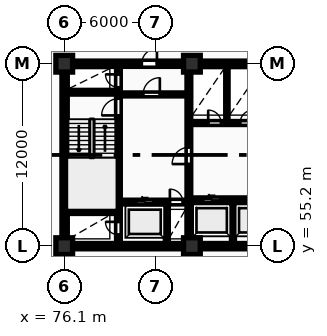
"""IFC4 building model, lengths in metres.
Left out: names, types, materials, properties, quantities, classifications, styles, units other than length and angle.
Written with IfcOpenShell. Run it as: python <this file> out.ifc"""

import sys

from ifc_helpers import new_model, si_unit, direction, frame, frame_2d, origin, origin_2d, place, context, subcontext, project, spatial, rectangle, extrude, element, fill, save


model = new_model("IFC4")
c1 = context("Model", 3, precision=1e-05, world=origin(), true_north=direction((0.0, 1.0)))
c2 = subcontext(c1, "Body", "Model", "MODEL_VIEW")
j1 = project(units=[si_unit("LENGTHUNIT", "METRE"), si_unit("PLANEANGLEUNIT", "RADIAN")], contexts=[c1])
p1 = place(None, origin())
s1 = spatial("IfcSite", under=j1, at=p1, CompositionType="ELEMENT")
p2 = place(p1, origin())
s2 = spatial("IfcBuilding", under=s1, at=p2, CompositionType="ELEMENT")
p3 = place(p2, frame((0.0, 0.0, -3.6)))
s3 = spatial("IfcBuildingStorey", under=s2, at=p3, CompositionType="ELEMENT", Elevation=-3.6)
for number, where, z_axis, x_axis in (
    (1, (76.1, 55.2, 0.0), (0.0, 0.0, 1.0), (1.0, 0.0, 0.0)),
    (2, (76.1, 67.2, 0.0), (0.0, 0.0, 1.0), (1.0, 0.0, 0.0)),
    (3, (84.5, 55.2, 0.0), (0.0, 0.0, 1.0), (1.0, 0.0, 0.0)),
    (4, (84.5, 67.2, 0.0), (0.0, 0.0, 1.0), (1.0, 0.0, 0.0)),
):
    element("IfcColumn", number, at=place(p3, frame(where, z_axis=z_axis, x_axis=x_axis)), inside=s3, PredefinedType="COLUMN", context=c2, shape_type="SweptSolid", body=[
        extrude(rectangle(XDim=1.1, YDim=1.1, at=origin_2d()), origin(), (0.0, 0.0, 1.0), 3.6),
    ])
p4 = place(p3, frame((75.95, 55.2, 0.0), z_axis=(0.0, 0.0, 1.0), x_axis=(1.0, 0.0, 0.0)))
e5 = element("IfcWall", 5, at=p4, inside=s3, PredefinedType="SHEAR", context=c2, shape_type="SweptSolid", body=[
    extrude(rectangle(XDim=36.3, YDim=0.35, at=frame_2d((18.15, 0.0))), origin(), (0.0, 0.0, 1.0), 3.6),
])
p5 = place(p3, frame((76.125, 55.375, 0.0), z_axis=(0.0, 0.0, 1.0), x_axis=(0.0, 1.0, 0.0)))
e6 = element("IfcWall", 6, at=p5, inside=s3, PredefinedType="SHEAR", context=c2, shape_type="SweptSolid", body=[
    extrude(rectangle(XDim=11.65, YDim=0.35, at=frame_2d((5.825, 0.0))), origin(), (0.0, 0.0, 1.0), 3.6),
])
p6 = place(p3, frame((75.95, 67.2, 0.0), z_axis=(0.0, 0.0, 1.0), x_axis=(1.0, 0.0, 0.0)))
e7 = element("IfcWall", 7, at=p6, inside=s3, PredefinedType="SHEAR", context=c2, shape_type="SweptSolid", body=[
    extrude(rectangle(XDim=36.3, YDim=0.35, at=frame_2d((18.15, 0.0))), origin(), (0.0, 0.0, 1.0), 3.6),
])
p7 = place(p6, frame((5.25, 0.0, 0.0)))
e8 = element("IfcOpeningElement", 8, at=p7, cuts=e7, PredefinedType="OPENING", context=c2, shape_type="SweptSolid", body=[
    extrude(rectangle(XDim=1.0, YDim=2.15, at=frame_2d((0.5, 1.075))), frame((0.0, 0.185, 0.0), z_axis=(0.0, -1.0, 0.0), x_axis=(1.0, 0.0, 0.0)), (0.0, 0.0, 1.0), 0.37),
])
p8 = place(p6, frame((21.6, 0.0, 0.0)))
e9 = element("IfcOpeningElement", 9, at=p8, cuts=e7, PredefinedType="OPENING", context=c2, shape_type="SweptSolid", body=[
    extrude(rectangle(XDim=1.5, YDim=2.2, at=frame_2d((0.75, 1.1))), frame((0.0, 0.185, 0.0), z_axis=(0.0, -1.0, 0.0), x_axis=(1.0, 0.0, 0.0)), (0.0, 0.0, 1.0), 0.37),
])
p9 = place(p6, frame((30.45, 0.0, 0.0)))
e10 = element("IfcOpeningElement", 10, at=p9, cuts=e7, PredefinedType="OPENING", context=c2, shape_type="SweptSolid", body=[
    extrude(rectangle(XDim=1.0, YDim=2.15, at=frame_2d((0.5, 1.075))), frame((0.0, 0.185, 0.0), z_axis=(0.0, -1.0, 0.0), x_axis=(1.0, 0.0, 0.0)), (0.0, 0.0, 1.0), 0.37),
])
p10 = place(p3, frame((79.665, 55.4, 0.0), z_axis=(0.0, 0.0, 1.0), x_axis=(0.0, 1.0, 0.0)))
e11 = element("IfcWall", 11, at=p10, inside=s3, PredefinedType="SHEAR", context=c2, shape_type="SweptSolid", body=[
    extrude(rectangle(XDim=11.6, YDim=0.25, at=frame_2d((5.8, 0.0))), origin(), (0.0, 0.0, 1.0), 3.6),
])
p11 = place(p10, frame((0.55, 0.0, 0.0)))
e12 = element("IfcOpeningElement", 12, at=p11, cuts=e11, PredefinedType="OPENING", context=c2, shape_type="SweptSolid", body=[
    extrude(rectangle(XDim=0.85, YDim=2.05, at=frame_2d((0.425, 1.025))), frame((0.0, 0.135, 0.0), z_axis=(0.0, -1.0, 0.0), x_axis=(1.0, 0.0, 0.0)), (0.0, 0.0, 1.0), 0.27),
])
p12 = place(p10, frame((8.4, 0.0, 0.0)))
e13 = element("IfcOpeningElement", 13, at=p12, cuts=e11, PredefinedType="OPENING", context=c2, shape_type="SweptSolid", body=[
    extrude(rectangle(XDim=1.1, YDim=2.1, at=frame_2d((0.55, 1.05))), frame((0.0, 0.135, 0.0), z_axis=(0.0, -1.0, 0.0), x_axis=(1.0, 0.0, 0.0)), (0.0, 0.0, 1.0), 0.27),
])
p13 = place(p10, frame((10.25, 0.0, 0.0)))
e14 = element("IfcOpeningElement", 14, at=p13, cuts=e11, PredefinedType="OPENING", context=c2, shape_type="SweptSolid", body=[
    extrude(rectangle(XDim=0.85, YDim=2.05, at=frame_2d((0.425, 1.025))), frame((0.0, 0.135, 0.0), z_axis=(0.0, -1.0, 0.0), x_axis=(1.0, 0.0, 0.0)), (0.0, 0.0, 1.0), 0.27),
])
for number, where, z_axis, x_axis in (
    (15, (76.3, 57.475, 0.0), (0.0, 0.0, 1.0), (1.0, 0.0, 0.0)),
    (16, (76.3, 65.325, 0.0), (0.0, 0.0, 1.0), (1.0, 0.0, 0.0)),
):
    element("IfcWall", number, at=place(p3, frame(where, z_axis=z_axis, x_axis=x_axis)), inside=s3, PredefinedType="SHEAR", context=c2, shape_type="SweptSolid", body=[
        extrude(rectangle(XDim=3.24, YDim=0.25, at=frame_2d((1.62, 0.0))), origin(), (0.0, 0.0, 1.0), 3.6),
    ])
p14 = place(p3, frame((79.79, 58.1, 0.0), z_axis=(0.0, 0.0, 1.0), x_axis=(1.0, 0.0, 0.0)))
e17 = element("IfcWall", 17, at=p14, inside=s3, PredefinedType="SHEAR", context=c2, shape_type="SweptSolid", body=[
    extrude(rectangle(XDim=4.39, YDim=0.25, at=frame_2d((2.195, 0.0))), origin(), (0.0, 0.0, 1.0), 3.6),
])
p15 = place(p14, frame((1.05, 0.0, 0.0)))
e18 = element("IfcOpeningElement", 18, at=p15, cuts=e17, PredefinedType="OPENING", context=c2, shape_type="SweptSolid", body=[
    extrude(rectangle(XDim=1.12, YDim=2.12, at=frame_2d((0.56, 1.06))), frame((0.0, 0.135, 0.0), z_axis=(0.0, -1.0, 0.0), x_axis=(1.0, 0.0, 0.0)), (0.0, 0.0, 1.0), 0.27),
])
p16 = place(p14, frame((3.26, 0.0, 0.0)))
e19 = element("IfcOpeningElement", 19, at=p16, cuts=e17, PredefinedType="OPENING", context=c2, shape_type="SweptSolid", body=[
    extrude(rectangle(XDim=0.85, YDim=2.05, at=frame_2d((0.425, 1.025))), frame((0.0, 0.135, 0.0), z_axis=(0.0, -1.0, 0.0), x_axis=(1.0, 0.0, 0.0)), (0.0, 0.0, 1.0), 0.27),
])
p17 = place(p3, frame((82.85, 55.4, 0.0), z_axis=(0.0, 0.0, 1.0), x_axis=(0.0, 1.0, 0.0)))
e20 = element("IfcWall", 20, at=p17, inside=s3, PredefinedType="PARTITIONING", context=c2, shape_type="SweptSolid", body=[
    extrude(rectangle(XDim=2.56, YDim=0.2, at=frame_2d((1.28, 0.0))), origin(), (0.0, 0.0, 1.0), 3.3),
])
p18 = place(p3, frame((79.79, 65.18, 0.0), z_axis=(0.0, 0.0, 1.0), x_axis=(1.0, 0.0, 0.0)))
e21 = element("IfcWall", 21, at=p18, inside=s3, PredefinedType="PARTITIONING", context=c2, shape_type="SweptSolid", body=[
    extrude(rectangle(XDim=4.39, YDim=0.2, at=frame_2d((2.195, 0.0))), origin(), (0.0, 0.0, 1.0), 3.3),
])
p19 = place(p18, frame((1.5, 0.0, 0.0)))
e22 = element("IfcOpeningElement", 22, at=p19, cuts=e21, PredefinedType="OPENING", context=c2, shape_type="SweptSolid", body=[
    extrude(rectangle(XDim=1.1, YDim=2.1, at=frame_2d((0.55, 1.05))), frame((0.0, 0.11, 0.0), z_axis=(0.0, -1.0, 0.0), x_axis=(1.0, 0.0, 0.0)), (0.0, 0.0, 1.0), 0.22),
])
p20 = place(p3, frame((84.3, 55.4, 0.0), z_axis=(0.0, 0.0, 1.0), x_axis=(0.0, 1.0, 0.0)))
e23 = element("IfcWall", 23, at=p20, inside=s3, PredefinedType="SHEAR", context=c2, shape_type="SweptSolid", body=[
    extrude(rectangle(XDim=11.6, YDim=0.25, at=frame_2d((5.8, 0.0))), origin(), (0.0, 0.0, 1.0), 3.6),
])
p21 = place(p20, frame((5.2, 0.0, 0.0)))
e24 = element("IfcOpeningElement", 24, at=p21, cuts=e23, PredefinedType="OPENING", context=c2, shape_type="SweptSolid", body=[
    extrude(rectangle(XDim=1.1, YDim=2.1, at=frame_2d((0.55, 1.05))), frame((0.0, 0.135, 0.0), z_axis=(0.0, -1.0, 0.0), x_axis=(1.0, 0.0, 0.0)), (0.0, 0.0, 1.0), 0.27),
])
p22 = place(p3, frame((87.2, 55.4, 0.0), z_axis=(0.0, 0.0, 1.0), x_axis=(0.0, 1.0, 0.0)))
e25 = element("IfcWall", 25, at=p22, inside=s3, PredefinedType="PARTITIONING", context=c2, shape_type="SweptSolid", body=[
    extrude(rectangle(XDim=2.72, YDim=0.2, at=frame_2d((1.36, 0.0))), origin(), (0.0, 0.0, 1.0), 3.3),
])
p23 = place(p3, frame((84.42, 58.25, 0.0), z_axis=(0.0, 0.0, 1.0), x_axis=(1.0, 0.0, 0.0)))
e26 = element("IfcWall", 26, at=p23, inside=s3, PredefinedType="SHEAR", context=c2, shape_type="SweptSolid", body=[
    extrude(rectangle(XDim=8.36, YDim=0.25, at=frame_2d((4.18, 0.0))), origin(), (0.0, 0.0, 1.0), 3.6),
])
p24 = place(p23, frame((0.82, 0.0, 0.0)))
e27 = element("IfcOpeningElement", 27, at=p24, cuts=e26, PredefinedType="OPENING", context=c2, shape_type="SweptSolid", body=[
    extrude(rectangle(XDim=1.12, YDim=2.12, at=frame_2d((0.56, 1.06))), frame((0.0, 0.135, 0.0), z_axis=(0.0, -1.0, 0.0), x_axis=(1.0, 0.0, 0.0)), (0.0, 0.0, 1.0), 0.27),
])
p25 = place(p23, frame((3.62, 0.0, 0.0)))
e28 = element("IfcOpeningElement", 28, at=p25, cuts=e26, PredefinedType="OPENING", context=c2, shape_type="SweptSolid", body=[
    extrude(rectangle(XDim=1.12, YDim=2.12, at=frame_2d((0.56, 1.06))), frame((0.0, 0.135, 0.0), z_axis=(0.0, -1.0, 0.0), x_axis=(1.0, 0.0, 0.0)), (0.0, 0.0, 1.0), 0.27),
])
p26 = place(p23, frame((6.42, 0.0, 0.0)))
e29 = element("IfcOpeningElement", 29, at=p26, cuts=e26, PredefinedType="OPENING", context=c2, shape_type="SweptSolid", body=[
    extrude(rectangle(XDim=1.12, YDim=2.12, at=frame_2d((0.56, 1.06))), frame((0.0, 0.135, 0.0), z_axis=(0.0, -1.0, 0.0), x_axis=(1.0, 0.0, 0.0)), (0.0, 0.0, 1.0), 0.27),
])
p27 = place(p3, frame((86.8, 63.4, 0.0), z_axis=(0.0, 0.0, 1.0), x_axis=(0.0, 1.0, 0.0)))
e30 = element("IfcWall", 30, at=p27, inside=s3, PredefinedType="PARTITIONING", context=c2, shape_type="SweptSolid", body=[
    extrude(rectangle(XDim=3.6, YDim=0.15, at=frame_2d((1.8, 0.0))), origin(), (0.0, 0.0, 1.0), 3.3),
])
p28 = place(p3, frame((84.42, 63.3, 0.0), z_axis=(0.0, 0.0, 1.0), x_axis=(1.0, 0.0, 0.0)))
e31 = element("IfcWall", 31, at=p28, inside=s3, PredefinedType="PARTITIONING", context=c2, shape_type="SweptSolid", body=[
    extrude(rectangle(XDim=19.83, YDim=0.2, at=frame_2d((9.915, 0.0))), origin(), (0.0, 0.0, 1.0), 3.3),
])
p29 = place(p28, frame((1.15, 0.0, 0.0)))
e32 = element("IfcOpeningElement", 32, at=p29, cuts=e31, PredefinedType="OPENING", context=c2, shape_type="SweptSolid", body=[
    extrude(rectangle(XDim=0.85, YDim=2.05, at=frame_2d((0.425, 1.025))), frame((0.0, 0.11, 0.0), z_axis=(0.0, -1.0, 0.0), x_axis=(1.0, 0.0, 0.0)), (0.0, 0.0, 1.0), 0.22),
])
p30 = place(p28, frame((3.25, 0.0, 0.0)))
e33 = element("IfcOpeningElement", 33, at=p30, cuts=e31, PredefinedType="OPENING", context=c2, shape_type="SweptSolid", body=[
    extrude(rectangle(XDim=0.85, YDim=2.05, at=frame_2d((0.425, 1.025))), frame((0.0, 0.11, 0.0), z_axis=(0.0, -1.0, 0.0), x_axis=(1.0, 0.0, 0.0)), (0.0, 0.0, 1.0), 0.22),
])
p31 = place(p28, frame((13.08, 0.0, 0.0)))
e34 = element("IfcOpeningElement", 34, at=p31, cuts=e31, PredefinedType="OPENING", context=c2, shape_type="SweptSolid", body=[
    extrude(rectangle(XDim=1.5, YDim=2.2, at=frame_2d((0.75, 1.1))), frame((0.0, 0.11, 0.0), z_axis=(0.0, -1.0, 0.0), x_axis=(1.0, 0.0, 0.0)), (0.0, 0.0, 1.0), 0.22),
])
p32 = place(p28, frame((6.68, 0.0, 0.0)))
e35 = element("IfcOpeningElement", 35, at=p32, cuts=e31, PredefinedType="OPENING", context=c2, shape_type="SweptSolid", body=[
    extrude(rectangle(XDim=0.92, YDim=2.08, at=frame_2d((0.46, 1.04))), frame((0.0, 0.11, 0.0), z_axis=(0.0, -1.0, 0.0), x_axis=(1.0, 0.0, 0.0)), (0.0, 0.0, 1.0), 0.22),
])
p33 = place(p28, frame((16.33, 0.0, 0.0)))
e36 = element("IfcOpeningElement", 36, at=p33, cuts=e31, PredefinedType="OPENING", context=c2, shape_type="SweptSolid", body=[
    extrude(rectangle(XDim=0.88, YDim=2.06, at=frame_2d((0.44, 1.03))), frame((0.0, 0.11, 0.0), z_axis=(0.0, -1.0, 0.0), x_axis=(1.0, 0.0, 0.0)), (0.0, 0.0, 1.0), 0.22),
])
p34 = place(p7, origin())
e37 = element("IfcDoor", 37, at=p34, inside=s3, OperationType="SINGLE_SWING_RIGHT", PredefinedType="DOOR", context=c2, shape_type="SweptSolid", body=[
    extrude(rectangle(XDim=1.0, YDim=2.15, at=frame_2d((0.5, 1.075))), frame((0.0, 0.025, 0.0), z_axis=(0.0, -1.0, 0.0), x_axis=(1.0, 0.0, 0.0)), (0.0, 0.0, 1.0), 0.05),
])
fill(e8, e37)
p35 = place(p11, origin())
e38 = element("IfcDoor", 38, at=p35, inside=s3, OperationType="SINGLE_SWING_RIGHT", PredefinedType="DOOR", context=c2, shape_type="SweptSolid", body=[
    extrude(rectangle(XDim=0.85, YDim=2.05, at=frame_2d((0.425, 1.025))), frame((0.0, 0.025, 0.0), z_axis=(0.0, -1.0, 0.0), x_axis=(1.0, 0.0, 0.0)), (0.0, 0.0, 1.0), 0.05),
])
fill(e12, e38)
p36 = place(p12, origin())
e39 = element("IfcDoor", 39, at=p36, inside=s3, OperationType="SINGLE_SWING_LEFT", PredefinedType="DOOR", context=c2, shape_type="SweptSolid", body=[
    extrude(rectangle(XDim=1.1, YDim=2.1, at=frame_2d((0.55, 1.05))), frame((0.0, 0.025, 0.0), z_axis=(0.0, -1.0, 0.0), x_axis=(1.0, 0.0, 0.0)), (0.0, 0.0, 1.0), 0.05),
])
fill(e13, e39)
p37 = place(p13, origin())
e40 = element("IfcDoor", 40, at=p37, inside=s3, OperationType="SINGLE_SWING_RIGHT", PredefinedType="DOOR", context=c2, shape_type="SweptSolid", body=[
    extrude(rectangle(XDim=0.85, YDim=2.05, at=frame_2d((0.425, 1.025))), frame((0.0, 0.025, 0.0), z_axis=(0.0, -1.0, 0.0), x_axis=(1.0, 0.0, 0.0)), (0.0, 0.0, 1.0), 0.05),
])
fill(e14, e40)
p38 = place(p15, origin())
e41 = element("IfcDoor", 41, at=p38, inside=s3, OperationType="SLIDING_TO_LEFT", PredefinedType="DOOR", context=c2, shape_type="SweptSolid", body=[
    extrude(rectangle(XDim=1.12, YDim=2.12, at=frame_2d((0.56, 1.06))), frame((0.0, 0.025, 0.0), z_axis=(0.0, -1.0, 0.0), x_axis=(1.0, 0.0, 0.0)), (0.0, 0.0, 1.0), 0.05),
])
fill(e18, e41)
p39 = place(p16, origin())
e42 = element("IfcDoor", 42, at=p39, inside=s3, OperationType="SINGLE_SWING_LEFT", PredefinedType="DOOR", context=c2, shape_type="SweptSolid", body=[
    extrude(rectangle(XDim=0.85, YDim=2.05, at=frame_2d((0.425, 1.025))), frame((0.0, 0.025, 0.0), z_axis=(0.0, -1.0, 0.0), x_axis=(1.0, 0.0, 0.0)), (0.0, 0.0, 1.0), 0.05),
])
fill(e19, e42)
p40 = place(p19, origin())
e43 = element("IfcDoor", 43, at=p40, inside=s3, OperationType="SINGLE_SWING_RIGHT", PredefinedType="DOOR", context=c2, shape_type="SweptSolid", body=[
    extrude(rectangle(XDim=1.1, YDim=2.1, at=frame_2d((0.55, 1.05))), frame((0.0, 0.025, 0.0), z_axis=(0.0, -1.0, 0.0), x_axis=(1.0, 0.0, 0.0)), (0.0, 0.0, 1.0), 0.05),
])
fill(e22, e43)
p41 = place(p21, origin())
e44 = element("IfcDoor", 44, at=p41, inside=s3, OperationType="SINGLE_SWING_LEFT", PredefinedType="DOOR", context=c2, shape_type="SweptSolid", body=[
    extrude(rectangle(XDim=1.1, YDim=2.1, at=frame_2d((0.55, 1.05))), frame((0.0, 0.025, 0.0), z_axis=(0.0, -1.0, 0.0), x_axis=(1.0, 0.0, 0.0)), (0.0, 0.0, 1.0), 0.05),
])
fill(e24, e44)
p42 = place(p24, origin())
e45 = element("IfcDoor", 45, at=p42, inside=s3, OperationType="SLIDING_TO_LEFT", PredefinedType="DOOR", context=c2, shape_type="SweptSolid", body=[
    extrude(rectangle(XDim=1.12, YDim=2.12, at=frame_2d((0.56, 1.06))), frame((0.0, 0.025, 0.0), z_axis=(0.0, -1.0, 0.0), x_axis=(1.0, 0.0, 0.0)), (0.0, 0.0, 1.0), 0.05),
])
fill(e27, e45)
p43 = place(p25, origin())
e46 = element("IfcDoor", 46, at=p43, inside=s3, OperationType="SLIDING_TO_LEFT", PredefinedType="DOOR", context=c2, shape_type="SweptSolid", body=[
    extrude(rectangle(XDim=1.12, YDim=2.12, at=frame_2d((0.56, 1.06))), frame((0.0, 0.025, 0.0), z_axis=(0.0, -1.0, 0.0), x_axis=(1.0, 0.0, 0.0)), (0.0, 0.0, 1.0), 0.05),
])
fill(e28, e46)
p44 = place(p29, origin())
e47 = element("IfcDoor", 47, at=p44, inside=s3, OperationType="SINGLE_SWING_LEFT", PredefinedType="DOOR", context=c2, shape_type="SweptSolid", body=[
    extrude(rectangle(XDim=0.85, YDim=2.05, at=frame_2d((0.425, 1.025))), frame((0.0, 0.025, 0.0), z_axis=(0.0, -1.0, 0.0), x_axis=(1.0, 0.0, 0.0)), (0.0, 0.0, 1.0), 0.05),
])
fill(e32, e47)
p45 = place(p30, origin())
e48 = element("IfcDoor", 48, at=p45, inside=s3, OperationType="SINGLE_SWING_RIGHT", PredefinedType="DOOR", context=c2, shape_type="SweptSolid", body=[
    extrude(rectangle(XDim=0.85, YDim=2.05, at=frame_2d((0.425, 1.025))), frame((0.0, 0.025, 0.0), z_axis=(0.0, -1.0, 0.0), x_axis=(1.0, 0.0, 0.0)), (0.0, 0.0, 1.0), 0.05),
])
fill(e33, e48)
save(model, sys.argv[1])
